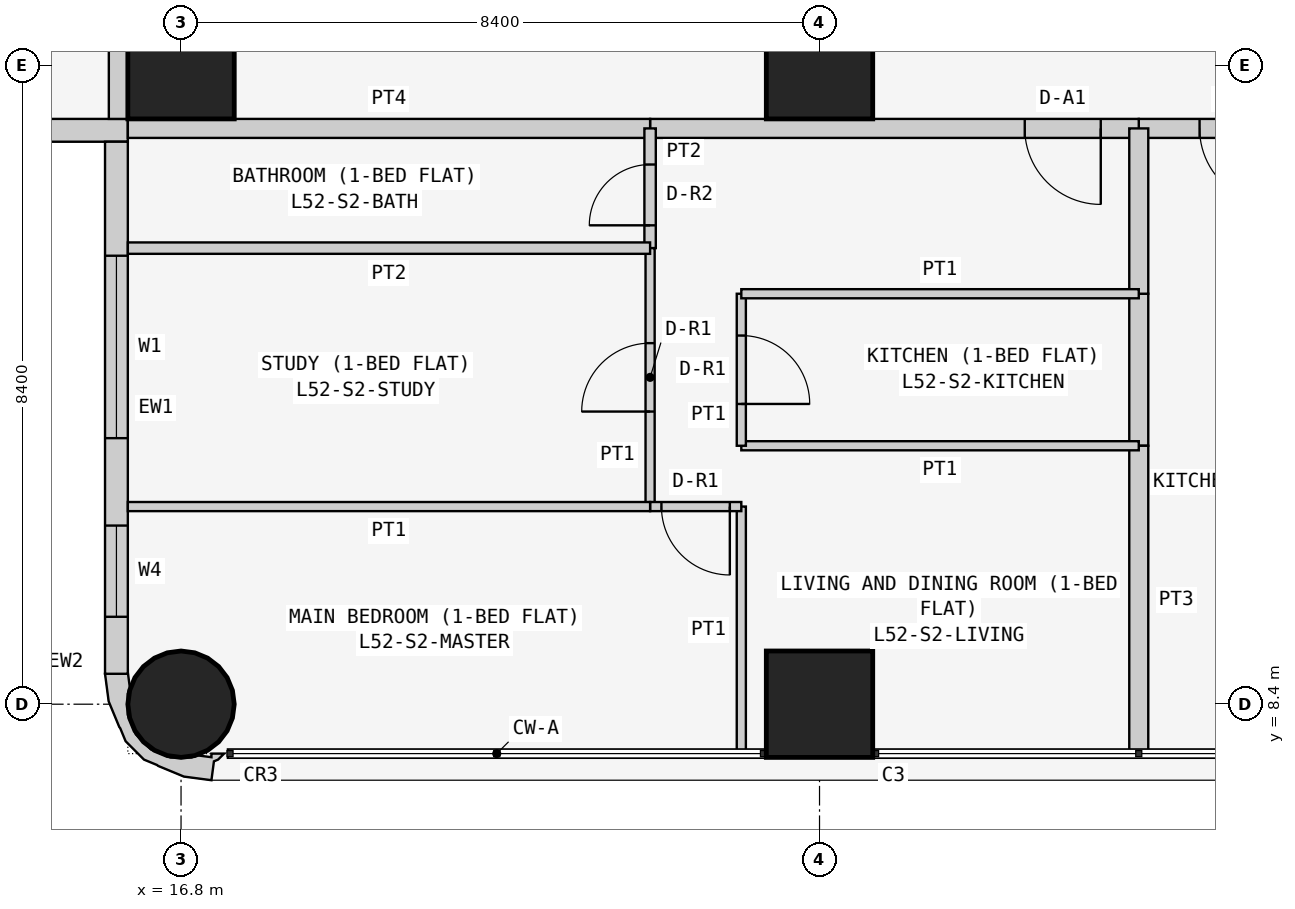
"""IFC4 building model, lengths in metres.
Left out: names, types, materials, properties, quantities, classifications, styles, units other than length and angle.
Written with IfcOpenShell. Run it as: python <this file> out.ifc"""

import sys

from ifc_helpers import new_model, si_unit, direction, frame, frame_2d, origin, origin_2d, place, context, subcontext, project, spatial, polyline, rectangle, circle, outline, extrude, element, fill, save


model = new_model("IFC4")
c1 = context("Model", 3, precision=1e-05, world=origin(), true_north=direction((0.0, 1.0)))
c2 = subcontext(c1, "Body", "Model", "MODEL_VIEW")
j1 = project(units=[si_unit("LENGTHUNIT", "METRE"), si_unit("PLANEANGLEUNIT", "RADIAN")], contexts=[c1])
p1 = place(None, origin())
s1 = spatial("IfcSite", under=j1, at=p1, CompositionType="ELEMENT")
p2 = place(p1, origin())
s2 = spatial("IfcBuilding", under=s1, at=p2, CompositionType="ELEMENT")
p3 = place(p2, frame((0.0, 0.0, 201.3)))
s3 = spatial("IfcBuildingStorey", under=s2, at=p3, CompositionType="ELEMENT", Elevation=201.3)
p4 = place(p3, frame((16.8, 8.4, 0.0), z_axis=(0.0, 0.0, 1.0), x_axis=(1.0, 0.0, 0.0)))
e1 = element("IfcColumn", 1, at=p4, inside=s3, PredefinedType="COLUMN", context=c2, shape_type="SweptSolid", body=[
    extrude(circle(Radius=0.7, at=origin_2d()), origin(), (0.0, 0.0, 1.0), 3.6),
])
for number, where, z_axis, x_axis in (
    (2, (16.8, 16.8, 0.0), (0.0, 0.0, 1.0), (1.0, 0.0, 0.0)),
    (3, (25.2, 8.4, 0.0), (0.0, 0.0, 1.0), (1.0, 0.0, 0.0)),
    (4, (25.2, 16.8, 0.0), (0.0, 0.0, 1.0), (1.0, 0.0, 0.0)),
):
    element("IfcColumn", number, at=place(p3, frame(where, z_axis=z_axis, x_axis=x_axis)), inside=s3, PredefinedType="COLUMN", context=c2, shape_type="SweptSolid", body=[
        extrude(rectangle(XDim=1.4, YDim=1.4, at=origin_2d()), origin(), (0.0, 0.0, 1.0), 3.6),
    ])
p5 = place(p3, frame((0.4, 15.95, 0.0), z_axis=(0.0, 0.0, 1.0), x_axis=(1.0, 0.0, 0.0)))
e5 = element("IfcWall", 5, at=p5, inside=s3, PredefinedType="SOLIDWALL", context=c2, shape_type="SweptSolid", body=[
    extrude(rectangle(XDim=15.7, YDim=0.3, at=frame_2d((7.85, 0.0))), origin(), (0.0, 0.0, 1.0), 3.45),
])
p6 = place(p5, frame((12.4, 0.0, 0.9)))
e6 = element("IfcOpeningElement", 6, at=p6, cuts=e5, PredefinedType="OPENING", context=c2, shape_type="SweptSolid", body=[
    extrude(rectangle(XDim=1.8, YDim=1.5, at=frame_2d((0.9, 0.75))), frame((0.0, 0.16, 0.0), z_axis=(0.0, -1.0, 0.0), x_axis=(1.0, 0.0, 0.0)), (0.0, 0.0, 1.0), 0.32),
])
p7 = place(p5, frame((9.55, 0.0, 1.5)))
e7 = element("IfcOpeningElement", 7, at=p7, cuts=e5, PredefinedType="OPENING", context=c2, shape_type="SweptSolid", body=[
    extrude(rectangle(XDim=0.9, YDim=0.7, at=frame_2d((0.45, 0.35))), frame((0.0, 0.16, 0.0), z_axis=(0.0, -1.0, 0.0), x_axis=(1.0, 0.0, 0.0)), (0.0, 0.0, 1.0), 0.32),
])
p8 = place(p5, frame((5.1, 0.0, 0.9)))
e8 = element("IfcOpeningElement", 8, at=p8, cuts=e5, PredefinedType="OPENING", context=c2, shape_type="SweptSolid", body=[
    extrude(rectangle(XDim=1.8, YDim=1.5, at=frame_2d((0.9, 0.75))), frame((0.0, 0.16, 0.0), z_axis=(0.0, -1.0, 0.0), x_axis=(1.0, 0.0, 0.0)), (0.0, 0.0, 1.0), 0.32),
])
p9 = place(p5, frame((2.0, 0.0, 0.0)))
e9 = element("IfcOpeningElement", 9, at=p9, cuts=e5, PredefinedType="OPENING", context=c2, shape_type="SweptSolid", body=[
    extrude(rectangle(XDim=0.9, YDim=2.4, at=frame_2d((0.45, 1.2))), frame((0.0, 0.16, 0.0), z_axis=(0.0, -1.0, 0.0), x_axis=(1.0, 0.0, 0.0)), (0.0, 0.0, 1.0), 0.32),
])
p10 = place(p5, frame((0.7, 0.0, 0.9)))
e10 = element("IfcOpeningElement", 10, at=p10, cuts=e5, PredefinedType="OPENING", context=c2, shape_type="SweptSolid", body=[
    extrude(rectangle(XDim=1.2, YDim=1.5, at=frame_2d((0.6, 0.75))), frame((0.0, 0.16, 0.0), z_axis=(0.0, -1.0, 0.0), x_axis=(1.0, 0.0, 0.0)), (0.0, 0.0, 1.0), 0.32),
])
p11 = place(p3, frame((15.95, 15.8, 0.0), z_axis=(0.0, 0.0, 1.0), x_axis=(0.0, -1.0, 0.0)))
e11 = element("IfcWall", 11, at=p11, inside=s3, PredefinedType="SOLIDWALL", context=c2, shape_type="SweptSolid", body=[
    extrude(rectangle(XDim=7.0, YDim=0.3, at=frame_2d((3.5, 0.0))), origin(), (0.0, 0.0, 1.0), 3.45),
])
p12 = place(p11, frame((1.5, 0.0, 0.9)))
e12 = element("IfcOpeningElement", 12, at=p12, cuts=e11, PredefinedType="OPENING", context=c2, shape_type="SweptSolid", body=[
    extrude(rectangle(XDim=2.4, YDim=1.5, at=frame_2d((1.2, 0.75))), frame((0.0, 0.16, 0.0), z_axis=(0.0, -1.0, 0.0), x_axis=(1.0, 0.0, 0.0)), (0.0, 0.0, 1.0), 0.32),
])
p13 = place(p11, frame((5.05, 0.0, 0.9)))
e13 = element("IfcOpeningElement", 13, at=p13, cuts=e11, PredefinedType="OPENING", context=c2, shape_type="SweptSolid", body=[
    extrude(rectangle(XDim=1.2, YDim=1.5, at=frame_2d((0.6, 0.75))), frame((0.0, 0.16, 0.0), z_axis=(0.0, -1.0, 0.0), x_axis=(1.0, 0.0, 0.0)), (0.0, 0.0, 1.0), 0.32),
])
p14 = place(p3, frame((16.076, 8.69, 0.0), z_axis=(0.0, 0.0, 1.0), x_axis=(-0.439933741929, -0.898030234854, 0.0)))
e14 = element("IfcWall", 14, at=p14, inside=s3, PredefinedType="SOLIDWALL", context=c2, shape_type="SweptSolid", body=[
    extrude(outline(polyline([(0.664, 1.577), (0.426, 1.497), (0.382, 1.536), (0.276, 1.572), (0.349, 1.423), (0.392, 1.444), (0.453, 1.261), (0.51, 1.211), (0.632, 0.961), (0.65, 0.683), (0.56, 0.419), (0.375, 0.21), (0.125, 0.087), (0.05, 0.082), (-0.127, -0.035), (-0.145, -0.044), (0.022, -0.296), (0.327, -0.094), (0.568, 0.18), (0.578, 0.199), (0.7, 0.337), (0.811, 0.661), (0.799, 0.846), (0.803, 0.866), (0.78, 1.231), (0.664, 1.577)])), origin(), (0.0, 0.0, 1.0), 3.45),
])
p15 = place(p3, frame((32.0, 15.975, 0.0), z_axis=(0.0, 0.0, 1.0), x_axis=(-1.0, 0.0, 0.0)))
e15 = element("IfcWall", 15, at=p15, inside=s3, PredefinedType="PARTITIONING", context=c2, shape_type="SweptSolid", body=[
    extrude(rectangle(XDim=2.6, YDim=0.25, at=frame_2d((1.3, 0.0))), origin(), (0.0, 0.0, 1.0), 3.45),
])
p16 = place(p15, frame((0.8, 0.0, 0.0)))
e16 = element("IfcOpeningElement", 16, at=p16, cuts=e15, PredefinedType="OPENING", context=c2, shape_type="SweptSolid", body=[
    extrude(rectangle(XDim=1.0, YDim=2.1, at=frame_2d((0.5, 1.05))), frame((0.0, 0.135, 0.0), z_axis=(0.0, -1.0, 0.0), x_axis=(1.0, 0.0, 0.0)), (0.0, 0.0, 1.0), 0.27),
])
p17 = place(p3, frame((29.4, 15.975, 0.0), z_axis=(0.0, 0.0, 1.0), x_axis=(-1.0, 0.0, 0.0)))
e17 = element("IfcWall", 17, at=p17, inside=s3, PredefinedType="PARTITIONING", context=c2, shape_type="SweptSolid", body=[
    extrude(rectangle(XDim=6.429, YDim=0.25, at=frame_2d((3.214, 0.0))), origin(), (0.0, 0.0, 1.0), 3.45),
])
p18 = place(p17, frame((0.5, 0.0, 0.0)))
e18 = element("IfcOpeningElement", 18, at=p18, cuts=e17, PredefinedType="OPENING", context=c2, shape_type="SweptSolid", body=[
    extrude(rectangle(XDim=1.0, YDim=2.1, at=frame_2d((0.5, 1.05))), frame((0.0, 0.135, 0.0), z_axis=(0.0, -1.0, 0.0), x_axis=(1.0, 0.0, 0.0)), (0.0, 0.0, 1.0), 0.27),
])
for number, where, z_axis, x_axis in (
    (19, (22.971, 15.975, 0.0), (0.0, 0.0, 1.0), (-1.0, 0.0, 0.0)),
    (20, (15.975, 16.1, 0.0), (0.0, 0.0, 1.0), (0.0, 1.0, 0.0)),
):
    element("IfcWall", number, at=place(p3, frame(where, z_axis=z_axis, x_axis=x_axis)), inside=s3, PredefinedType="PARTITIONING", context=c2, shape_type="SweptSolid", body=[
        extrude(rectangle(XDim=6.871, YDim=0.25, at=frame_2d((3.436, 0.0))), origin(), (0.0, 0.0, 1.0), 3.45),
    ])
p19 = place(p3, frame((29.4, 11.8, 0.0), z_axis=(0.0, 0.0, 1.0), x_axis=(0.0, 1.0, 0.0)))
e21 = element("IfcWall", 21, at=p19, inside=s3, PredefinedType="PARTITIONING", context=c2, shape_type="SweptSolid", body=[
    extrude(rectangle(XDim=2.0, YDim=0.25, at=frame_2d((1.0, 0.0))), origin(), (0.0, 0.0, 1.0), 2.848),
])
p20 = place(p3, frame((29.4, 7.75, 0.0), z_axis=(0.0, 0.0, 1.0), x_axis=(0.0, 1.0, 0.0)))
e22 = element("IfcWall", 22, at=p20, inside=s3, PredefinedType="PARTITIONING", context=c2, shape_type="SweptSolid", body=[
    extrude(rectangle(XDim=4.05, YDim=0.25, at=frame_2d((2.025, 0.0))), origin(), (0.0, 0.0, 1.0), 2.848),
])
p21 = place(p3, frame((29.4, 13.8, 0.0), z_axis=(0.0, 0.0, 1.0), x_axis=(0.0, 1.0, 0.0)))
e23 = element("IfcWall", 23, at=p21, inside=s3, PredefinedType="PARTITIONING", context=c2, shape_type="SweptSolid", body=[
    extrude(rectangle(XDim=2.175, YDim=0.25, at=frame_2d((1.087, 0.0))), origin(), (0.0, 0.0, 1.0), 2.848),
])
p22 = place(p3, frame((29.4, 11.8, 0.0), z_axis=(0.0, 0.0, 1.0), x_axis=(-1.0, 0.0, 0.0)))
e24 = element("IfcWall", 24, at=p22, inside=s3, PredefinedType="PARTITIONING", context=c2, shape_type="SweptSolid", body=[
    extrude(rectangle(XDim=5.229, YDim=0.12, at=frame_2d((2.615, 0.0))), origin(), (0.0, 0.0, 1.0), 3.45),
])
p23 = place(p3, frame((24.171, 11.8, 0.0), z_axis=(0.0, 0.0, 1.0), x_axis=(0.0, 1.0, 0.0)))
e25 = element("IfcWall", 25, at=p23, inside=s3, PredefinedType="PARTITIONING", context=c2, shape_type="SweptSolid", body=[
    extrude(rectangle(XDim=2.0, YDim=0.12, at=frame_2d((1.0, 0.0))), origin(), (0.0, 0.0, 1.0), 3.45),
])
p24 = place(p23, frame((0.55, 0.0, 0.0)))
e26 = element("IfcOpeningElement", 26, at=p24, cuts=e25, PredefinedType="OPENING", context=c2, shape_type="SweptSolid", body=[
    extrude(rectangle(XDim=0.9, YDim=2.1, at=frame_2d((0.45, 1.05))), frame((0.0, 0.07, 0.0), z_axis=(0.0, -1.0, 0.0), x_axis=(1.0, 0.0, 0.0)), (0.0, 0.0, 1.0), 0.14),
])
p25 = place(p3, frame((24.171, 13.8, 0.0), z_axis=(0.0, 0.0, 1.0), x_axis=(1.0, 0.0, 0.0)))
e27 = element("IfcWall", 27, at=p25, inside=s3, PredefinedType="PARTITIONING", context=c2, shape_type="SweptSolid", body=[
    extrude(rectangle(XDim=5.229, YDim=0.12, at=frame_2d((2.615, 0.0))), origin(), (0.0, 0.0, 1.0), 3.45),
])
p26 = place(p3, frame((22.971, 14.4, 0.0), z_axis=(0.0, 0.0, 1.0), x_axis=(0.0, 1.0, 0.0)))
e28 = element("IfcWall", 28, at=p26, inside=s3, PredefinedType="PARTITIONING", context=c2, shape_type="SweptSolid", body=[
    extrude(rectangle(XDim=1.575, YDim=0.15, at=frame_2d((0.788, 0.0))), origin(), (0.0, 0.0, 1.0), 3.45),
])
p27 = place(p26, frame((0.3, 0.0, 0.0)))
e29 = element("IfcOpeningElement", 29, at=p27, cuts=e28, PredefinedType="OPENING", context=c2, shape_type="SweptSolid", body=[
    extrude(rectangle(XDim=0.8, YDim=2.1, at=frame_2d((0.4, 1.05))), frame((0.0, 0.085, 0.0), z_axis=(0.0, -1.0, 0.0), x_axis=(1.0, 0.0, 0.0)), (0.0, 0.0, 1.0), 0.17),
])
p28 = place(p3, frame((22.971, 11.0, 0.0), z_axis=(0.0, 0.0, 1.0), x_axis=(0.0, 1.0, 0.0)))
e30 = element("IfcWall", 30, at=p28, inside=s3, PredefinedType="PARTITIONING", context=c2, shape_type="SweptSolid", body=[
    extrude(rectangle(XDim=3.4, YDim=0.12, at=frame_2d((1.7, 0.0))), origin(), (0.0, 0.0, 1.0), 3.45),
])
p29 = place(p28, frame((1.25, 0.0, 0.0)))
e31 = element("IfcOpeningElement", 31, at=p29, cuts=e30, PredefinedType="OPENING", context=c2, shape_type="SweptSolid", body=[
    extrude(rectangle(XDim=0.9, YDim=2.1, at=frame_2d((0.45, 1.05))), frame((0.0, 0.07, 0.0), z_axis=(0.0, -1.0, 0.0), x_axis=(1.0, 0.0, 0.0)), (0.0, 0.0, 1.0), 0.14),
])
p30 = place(p3, frame((24.171, 7.75, 0.0), z_axis=(0.0, 0.0, 1.0), x_axis=(0.0, 1.0, 0.0)))
e32 = element("IfcWall", 32, at=p30, inside=s3, PredefinedType="PARTITIONING", context=c2, shape_type="SweptSolid", body=[
    extrude(rectangle(XDim=3.25, YDim=0.12, at=frame_2d((1.625, 0.0))), origin(), (0.0, 0.0, 1.0), 3.45),
])
p31 = place(p3, frame((24.171, 11.0, 0.0), z_axis=(0.0, 0.0, 1.0), x_axis=(-1.0, 0.0, 0.0)))
e33 = element("IfcWall", 33, at=p31, inside=s3, PredefinedType="PARTITIONING", context=c2, shape_type="SweptSolid", body=[
    extrude(rectangle(XDim=1.2, YDim=0.12, at=frame_2d((0.6, 0.0))), origin(), (0.0, 0.0, 1.0), 3.45),
])
p32 = place(p31, frame((0.151, 0.0, 0.0)))
e34 = element("IfcOpeningElement", 34, at=p32, cuts=e33, PredefinedType="OPENING", context=c2, shape_type="SweptSolid", body=[
    extrude(rectangle(XDim=0.9, YDim=2.1, at=frame_2d((0.45, 1.05))), frame((0.0, 0.07, 0.0), z_axis=(0.0, -1.0, 0.0), x_axis=(1.0, 0.0, 0.0)), (0.0, 0.0, 1.0), 0.14),
])
p33 = place(p3, frame((22.971, 14.4, 0.0), z_axis=(0.0, 0.0, 1.0), x_axis=(-1.0, 0.0, 0.0)))
e35 = element("IfcWall", 35, at=p33, inside=s3, PredefinedType="PARTITIONING", context=c2, shape_type="SweptSolid", body=[
    extrude(rectangle(XDim=6.871, YDim=0.15, at=frame_2d((3.436, 0.0))), origin(), (0.0, 0.0, 1.0), 3.45),
])
p34 = place(p3, frame((22.971, 11.0, 0.0), z_axis=(0.0, 0.0, 1.0), x_axis=(-1.0, 0.0, 0.0)))
e36 = element("IfcWall", 36, at=p34, inside=s3, PredefinedType="PARTITIONING", context=c2, shape_type="SweptSolid", body=[
    extrude(rectangle(XDim=6.871, YDim=0.12, at=frame_2d((3.436, 0.0))), origin(), (0.0, 0.0, 1.0), 3.45),
])
p35 = place(p12, origin())
e37 = element("IfcWindow", 37, at=p35, inside=s3, PartitioningType="SINGLE_PANEL", PredefinedType="WINDOW", context=c2, shape_type="SweptSolid", body=[
    extrude(rectangle(XDim=2.4, YDim=1.5, at=frame_2d((1.2, 0.75))), frame((0.0, 0.03, 0.0), z_axis=(0.0, -1.0, 0.0), x_axis=(1.0, 0.0, 0.0)), (0.0, 0.0, 1.0), 0.06),
])
fill(e12, e37)
p36 = place(p13, origin())
e38 = element("IfcWindow", 38, at=p36, inside=s3, PartitioningType="SINGLE_PANEL", PredefinedType="WINDOW", context=c2, shape_type="SweptSolid", body=[
    extrude(rectangle(XDim=1.2, YDim=1.5, at=frame_2d((0.6, 0.75))), frame((0.0, 0.03, 0.0), z_axis=(0.0, -1.0, 0.0), x_axis=(1.0, 0.0, 0.0)), (0.0, 0.0, 1.0), 0.06),
])
fill(e13, e38)
p37 = place(p16, origin())
e39 = element("IfcDoor", 39, at=p37, inside=s3, OperationType="SINGLE_SWING_LEFT", PredefinedType="DOOR", context=c2, shape_type="SweptSolid", body=[
    extrude(rectangle(XDim=1.0, YDim=2.1, at=frame_2d((0.5, 1.05))), frame((0.0, 0.025, 0.0), z_axis=(0.0, -1.0, 0.0), x_axis=(1.0, 0.0, 0.0)), (0.0, 0.0, 1.0), 0.05),
])
fill(e16, e39)
p38 = place(p18, origin())
e40 = element("IfcDoor", 40, at=p38, inside=s3, OperationType="SINGLE_SWING_LEFT", PredefinedType="DOOR", context=c2, shape_type="SweptSolid", body=[
    extrude(rectangle(XDim=1.0, YDim=2.1, at=frame_2d((0.5, 1.05))), frame((0.0, 0.025, 0.0), z_axis=(0.0, -1.0, 0.0), x_axis=(1.0, 0.0, 0.0)), (0.0, 0.0, 1.0), 0.05),
])
fill(e18, e40)
p39 = place(p24, frame((0.9, 0.0, 0.0), z_axis=(0.0, 0.0, 1.0), x_axis=(-1.0, 0.0, 0.0)))
e41 = element("IfcDoor", 41, at=p39, inside=s3, OperationType="SINGLE_SWING_RIGHT", PredefinedType="DOOR", context=c2, shape_type="SweptSolid", body=[
    extrude(rectangle(XDim=0.9, YDim=2.1, at=frame_2d((0.45, 1.05))), frame((0.0, 0.025, 0.0), z_axis=(0.0, -1.0, 0.0), x_axis=(1.0, 0.0, 0.0)), (0.0, 0.0, 1.0), 0.05),
])
fill(e26, e41)
p40 = place(p27, origin())
e42 = element("IfcDoor", 42, at=p40, inside=s3, OperationType="SINGLE_SWING_LEFT", PredefinedType="DOOR", context=c2, shape_type="SweptSolid", body=[
    extrude(rectangle(XDim=0.8, YDim=2.1, at=frame_2d((0.4, 1.05))), frame((0.0, 0.025, 0.0), z_axis=(0.0, -1.0, 0.0), x_axis=(1.0, 0.0, 0.0)), (0.0, 0.0, 1.0), 0.05),
])
fill(e29, e42)
p41 = place(p29, origin())
e43 = element("IfcDoor", 43, at=p41, inside=s3, OperationType="SINGLE_SWING_LEFT", PredefinedType="DOOR", context=c2, shape_type="SweptSolid", body=[
    extrude(rectangle(XDim=0.9, YDim=2.1, at=frame_2d((0.45, 1.05))), frame((0.0, 0.025, 0.0), z_axis=(0.0, -1.0, 0.0), x_axis=(1.0, 0.0, 0.0)), (0.0, 0.0, 1.0), 0.05),
])
fill(e31, e43)
p42 = place(p32, origin())
e44 = element("IfcDoor", 44, at=p42, inside=s3, OperationType="SINGLE_SWING_LEFT", PredefinedType="DOOR", context=c2, shape_type="SweptSolid", body=[
    extrude(rectangle(XDim=0.9, YDim=2.1, at=frame_2d((0.45, 1.05))), frame((0.0, 0.025, 0.0), z_axis=(0.0, -1.0, 0.0), x_axis=(1.0, 0.0, 0.0)), (0.0, 0.0, 1.0), 0.05),
])
fill(e34, e44)
save(model, sys.argv[1])
